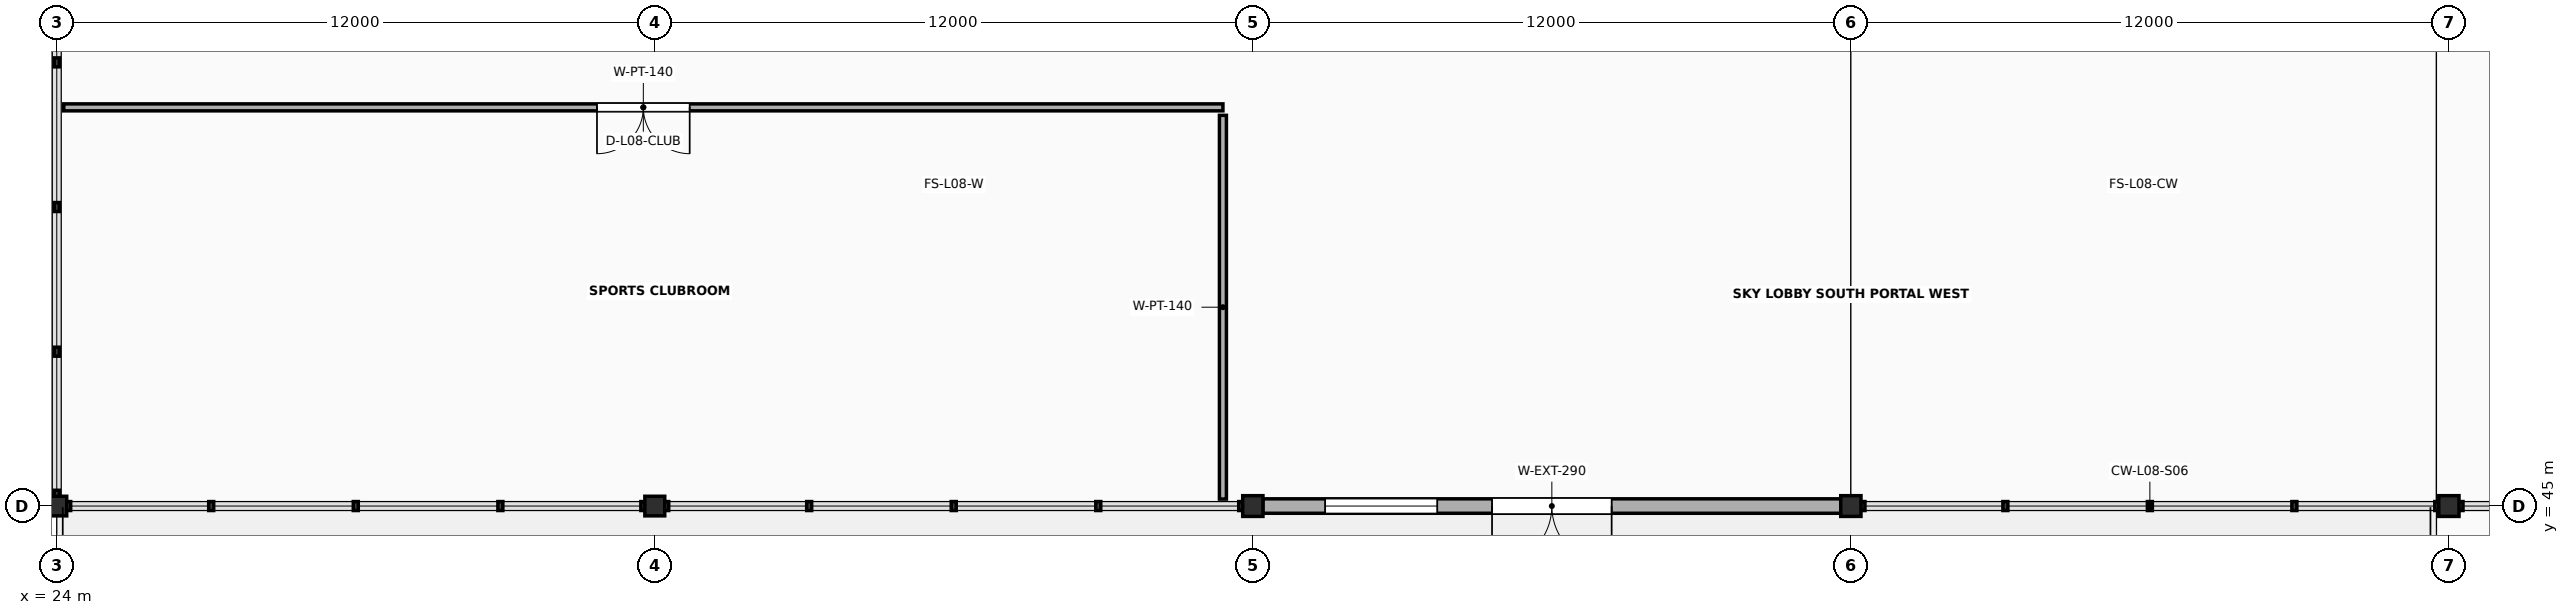
"""IFC4 building model, lengths in metres.
Left out: names, types, materials, properties, quantities, classifications, styles, units other than length and angle.
Written with IfcOpenShell. Run it as: python <this file> out.ifc"""

import sys

from ifc_helpers import new_model, si_unit, direction, frame, frame_2d, origin, origin_2d, place, context, subcontext, project, spatial, rectangle, i_section, extrude, element, fill, save


model = new_model("IFC4")
c1 = context("Model", 3, precision=1e-05, world=origin(), true_north=direction((0.0, 1.0)))
c2 = subcontext(c1, "Body", "Model", "MODEL_VIEW")
j1 = project(units=[si_unit("LENGTHUNIT", "METRE"), si_unit("PLANEANGLEUNIT", "RADIAN")], contexts=[c1])
p1 = place(None, origin())
s1 = spatial("IfcSite", under=j1, at=p1, CompositionType="ELEMENT")
p2 = place(p1, origin())
s2 = spatial("IfcBuilding", under=s1, at=p2, CompositionType="ELEMENT")
p3 = place(p2, frame((0.0, 0.0, 32.4)))
s3 = spatial("IfcBuildingStorey", under=s2, at=p3, CompositionType="ELEMENT", Elevation=32.4)
for number, where, z_axis, x_axis in (
    (1, (24.0, 45.0, 0.0), (0.0, 0.0, 1.0), (1.0, 0.0, 0.0)),
    (2, (36.0, 45.0, 0.0), (0.0, 0.0, 1.0), (1.0, 0.0, 0.0)),
):
    element("IfcColumn", number, at=place(p3, frame(where, z_axis=z_axis, x_axis=x_axis)), inside=s3, PredefinedType="COLUMN", context=c2, shape_type="SweptSolid", body=[
        extrude(i_section(OverallWidth=0.399, OverallDepth=0.393, WebThickness=0.023, FlangeThickness=0.037, FilletRadius=0.018, at=origin_2d()), origin(), (0.0, 0.0, 1.0), 5.2),
    ])
for number, where, z_axis, x_axis in (
    (3, (48.0, 45.0, 0.0), (0.0, 0.0, 1.0), (1.0, 0.0, 0.0)),
    (4, (60.0, 45.0, 0.0), (0.0, 0.0, 1.0), (1.0, 0.0, 0.0)),
    (5, (72.0, 45.0, 0.0), (0.0, 0.0, 1.0), (1.0, 0.0, 0.0)),
):
    element("IfcColumn", number, at=place(p3, frame(where, z_axis=z_axis, x_axis=x_axis)), inside=s3, PredefinedType="COLUMN", context=c2, shape_type="SweptSolid", body=[
        extrude(i_section(OverallWidth=0.406, OverallDepth=0.416, WebThickness=0.03, FlangeThickness=0.048, FilletRadius=0.018, at=origin_2d()), origin(), (0.0, 0.0, 1.0), 5.2),
    ])
p4 = place(p3, frame((48.201, 45.0, 0.0), z_axis=(0.0, 0.0, 1.0), x_axis=(1.0, 0.0, 0.0)))
e6 = element("IfcWall", 6, at=p4, inside=s3, PredefinedType="SOLIDWALL", context=c2, shape_type="SweptSolid", body=[
    extrude(rectangle(XDim=11.598, YDim=0.29, at=frame_2d((5.799, 0.0))), origin(), (0.0, 0.0, 1.0), 4.1),
])
p5 = place(p4, frame((4.599, 0.0, 0.0)))
e7 = element("IfcOpeningElement", 7, at=p5, cuts=e6, PredefinedType="OPENING", context=c2, shape_type="SweptSolid", body=[
    extrude(rectangle(XDim=2.4, YDim=2.54, at=frame_2d((1.2, 1.27))), frame((0.0, 0.16, 0.0), z_axis=(0.0, -1.0, 0.0), x_axis=(1.0, 0.0, 0.0)), (0.0, 0.0, 1.0), 0.32),
])
p6 = place(p4, frame((1.25, 0.0, 1.95)))
e8 = element("IfcOpeningElement", 8, at=p6, cuts=e6, PredefinedType="OPENING", context=c2, shape_type="SweptSolid", body=[
    extrude(rectangle(XDim=2.25, YDim=0.88, at=frame_2d((1.125, 0.44))), frame((0.0, 0.16, 0.0), z_axis=(0.0, -1.0, 0.0), x_axis=(1.0, 0.0, 0.0)), (0.0, 0.0, 1.0), 0.32),
])
p7 = place(p3, frame((24.14, 53.0, 0.0), z_axis=(0.0, 0.0, 1.0), x_axis=(1.0, 0.0, 0.0)))
e9 = element("IfcWall", 9, at=p7, inside=s3, PredefinedType="PARTITIONING", context=c2, shape_type="SweptSolid", body=[
    extrude(rectangle(XDim=23.26, YDim=0.14, at=frame_2d((11.63, 0.0))), origin(), (0.0, 0.0, 1.0), 2.88),
])
p8 = place(p7, frame((10.7, 0.0, 0.0)))
e10 = element("IfcOpeningElement", 10, at=p8, cuts=e9, PredefinedType="OPENING", context=c2, shape_type="SweptSolid", body=[
    extrude(rectangle(XDim=1.86, YDim=2.41, at=frame_2d((0.93, 1.205))), frame((0.0, 0.085, 0.0), z_axis=(0.0, -1.0, 0.0), x_axis=(1.0, 0.0, 0.0)), (0.0, 0.0, 1.0), 0.17),
])
p9 = place(p3, frame((47.4, 45.14, 0.0), z_axis=(0.0, 0.0, 1.0), x_axis=(0.0, 1.0, 0.0)))
e11 = element("IfcWall", 11, at=p9, inside=s3, PredefinedType="PARTITIONING", context=c2, shape_type="SweptSolid", body=[
    extrude(rectangle(XDim=7.7, YDim=0.14, at=frame_2d((3.85, 0.0))), origin(), (0.0, 0.0, 1.0), 2.88),
])
p10 = place(p5, origin())
e12 = element("IfcDoor", 12, at=p10, inside=s3, OperationType="DOUBLE_DOOR_SINGLE_SWING", PredefinedType="DOOR", context=c2, shape_type="SweptSolid", body=[
    extrude(rectangle(XDim=2.4, YDim=2.54, at=frame_2d((1.2, 1.27))), frame((0.0, 0.025, 0.0), z_axis=(0.0, -1.0, 0.0), x_axis=(1.0, 0.0, 0.0)), (0.0, 0.0, 1.0), 0.05),
])
fill(e7, e12)
p11 = place(p6, origin())
e13 = element("IfcWindow", 13, at=p11, inside=s3, PartitioningType="DOUBLE_PANEL_VERTICAL", PredefinedType="USERDEFINED", context=c2, shape_type="SweptSolid", body=[
    extrude(rectangle(XDim=2.25, YDim=0.88, at=frame_2d((1.125, 0.44))), frame((0.0, 0.03, 0.0), z_axis=(0.0, -1.0, 0.0), x_axis=(1.0, 0.0, 0.0)), (0.0, 0.0, 1.0), 0.06),
])
fill(e8, e13)
p12 = place(p8, origin())
e14 = element("IfcDoor", 14, at=p12, inside=s3, OperationType="DOUBLE_DOOR_SINGLE_SWING", PredefinedType="DOOR", context=c2, shape_type="SweptSolid", body=[
    extrude(rectangle(XDim=1.86, YDim=2.41, at=frame_2d((0.93, 1.205))), frame((0.0, 0.025, 0.0), z_axis=(0.0, -1.0, 0.0), x_axis=(1.0, 0.0, 0.0)), (0.0, 0.0, 1.0), 0.05),
])
fill(e10, e14)
save(model, sys.argv[1])
